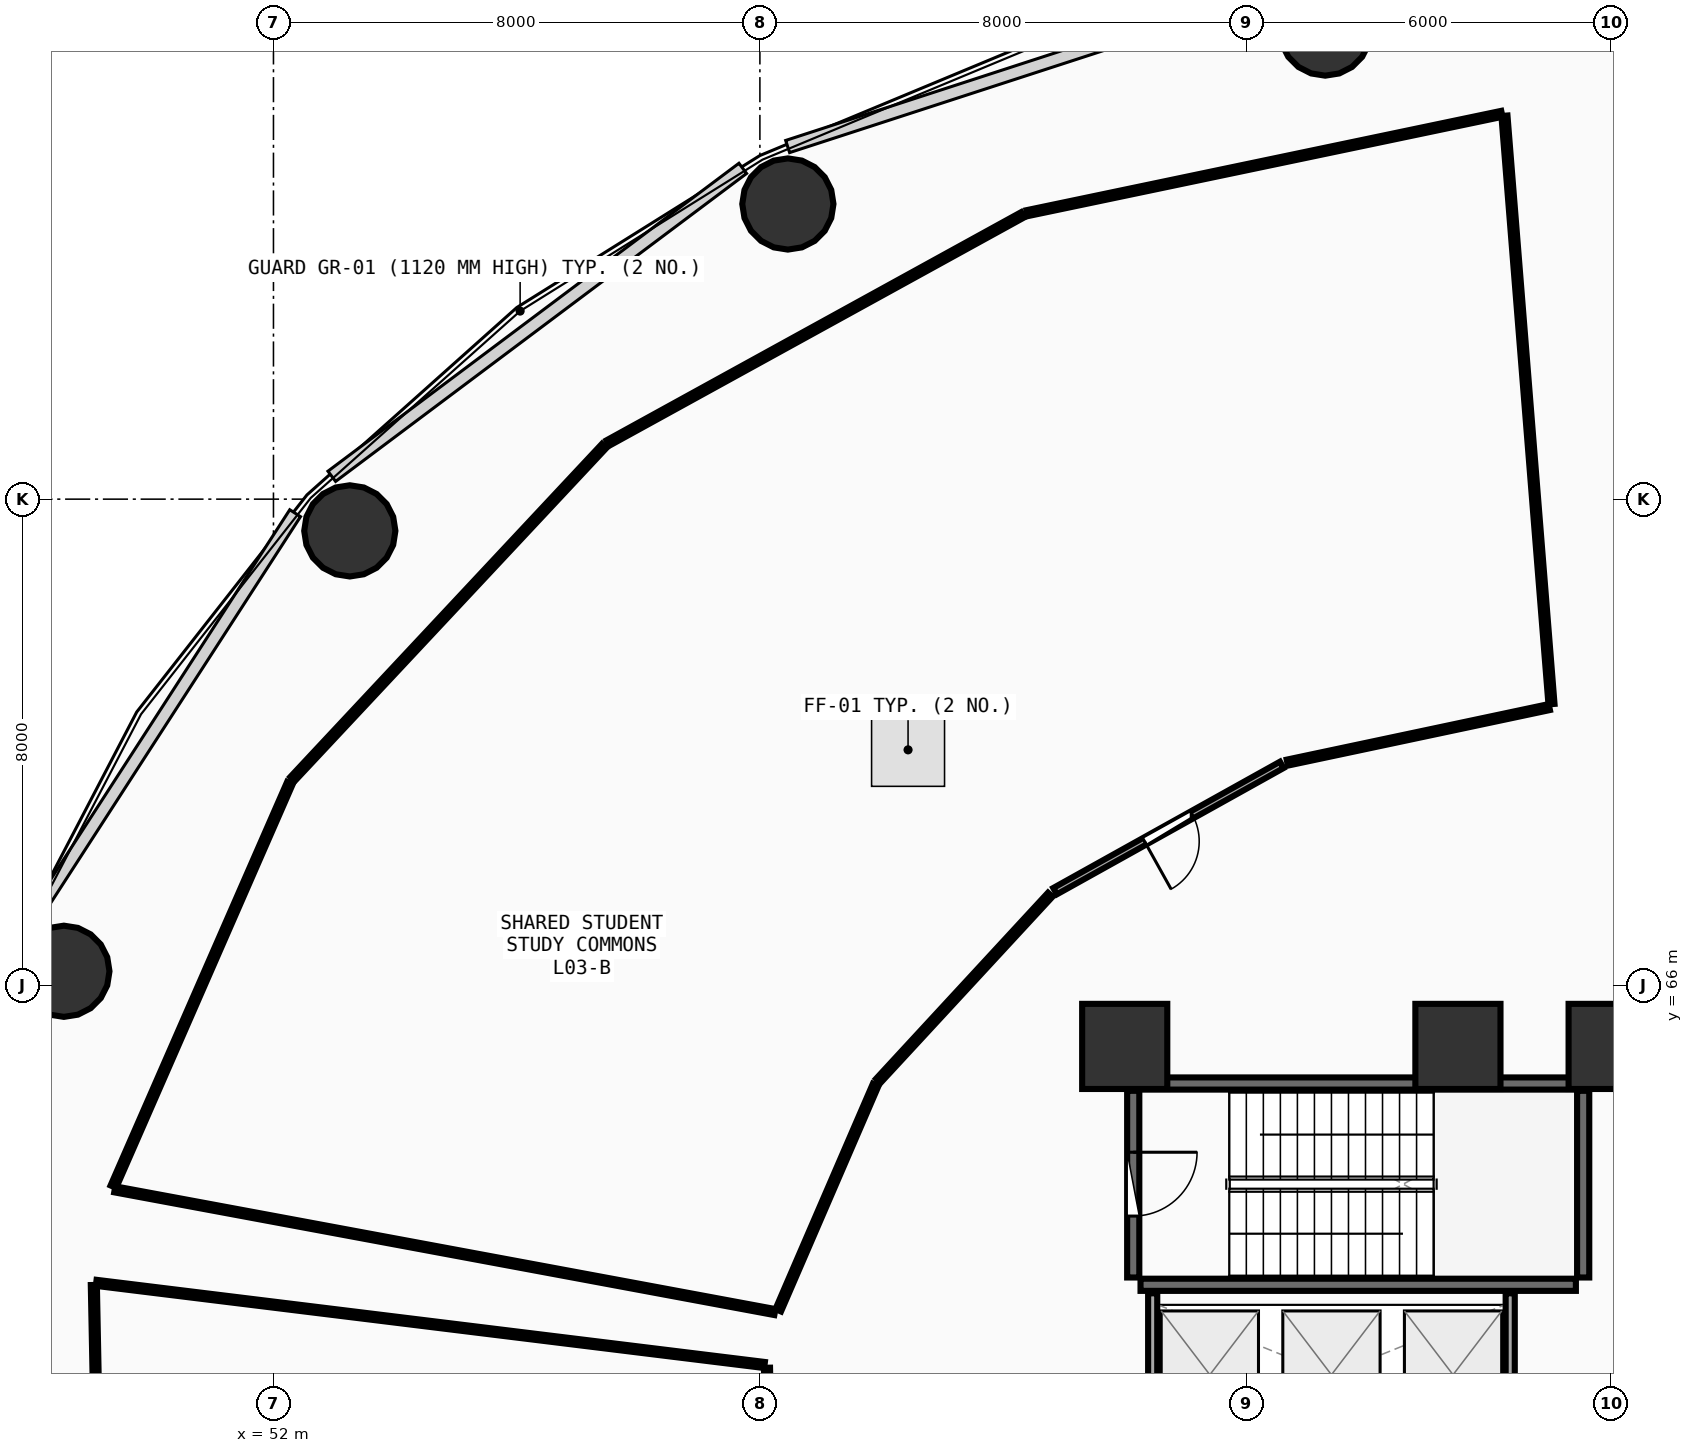
"""IFC4 building model, lengths in metres.
Left out: names, types, materials, properties, quantities, classifications, styles, units other than length and angle.
Written with IfcOpenShell. Run it as: python <this file> out.ifc"""

import sys

from ifc_helpers import new_model, si_unit, direction, frame, frame_2d, origin, origin_2d, place, context, subcontext, project, spatial, rectangle, circle, extrude, element, fill, save


model = new_model("IFC4")
c1 = context("Model", 3, precision=1e-05, world=origin(), true_north=direction((0.0, 1.0)))
c2 = subcontext(c1, "Body", "Model", "MODEL_VIEW")
j1 = project(units=[si_unit("LENGTHUNIT", "METRE"), si_unit("PLANEANGLEUNIT", "RADIAN")], contexts=[c1])
p1 = place(None, origin())
s1 = spatial("IfcSite", under=j1, at=p1, CompositionType="ELEMENT")
p2 = place(p1, origin())
s2 = spatial("IfcBuilding", under=s1, at=p2, CompositionType="ELEMENT")
p3 = place(p2, frame((0.0, 0.0, 13.5)))
s3 = spatial("IfcBuildingStorey", under=s2, at=p3, CompositionType="ELEMENT", Elevation=13.5)
for number, where, z_axis, x_axis in (
    (1, (74.0, 65.0, 0.0), (0.0, 0.0, 1.0), (1.0, 0.0, 0.0)),
    (2, (71.48, 65.0, 0.0), (0.0, 0.0, 1.0), (1.0, 0.0, 0.0)),
    (3, (66.0, 65.0, 0.0), (0.0, 0.0, 1.0), (1.0, 0.0, 0.0)),
):
    element("IfcColumn", number, at=place(p3, frame(where, z_axis=z_axis, x_axis=x_axis)), inside=s3, PredefinedType="PILASTER", context=c2, shape_type="SweptSolid", body=[
        extrude(rectangle(XDim=1.4, YDim=1.4, at=origin_2d()), origin(), (0.0, 0.0, 1.0), 4.5),
    ])
for number, where, z_axis, x_axis in (
    (4, (69.298, 81.714, 0.0), (0.0, 0.0, 1.0), (1.0, 0.0, 0.0)),
    (5, (60.46, 78.854, 0.0), (0.0, 0.0, 1.0), (1.0, 0.0, 0.0)),
    (6, (53.256, 73.478, 0.0), (0.0, 0.0, 1.0), (1.0, 0.0, 0.0)),
    (7, (48.553, 66.236, 0.0), (0.0, 0.0, 1.0), (1.0, 0.0, 0.0)),
):
    element("IfcColumn", number, at=place(p3, frame(where, z_axis=z_axis, x_axis=x_axis)), inside=s3, PredefinedType="COLUMN", context=c2, shape_type="SweptSolid", body=[
        extrude(circle(Radius=0.75, at=origin_2d()), origin(), (0.0, 0.0, 1.0), 4.5),
    ])
p4 = place(p3, frame((66.26, 61.08, 0.0), z_axis=(0.0, 0.0, 1.0), x_axis=(1.0, 0.0, 0.0)))
e8 = element("IfcWall", 8, at=p4, inside=s3, PredefinedType="SHEAR", context=c2, shape_type="SweptSolid", body=[
    extrude(rectangle(XDim=7.16, YDim=0.2, at=frame_2d((3.58, 0.0))), origin(), (0.0, 0.0, 1.0), 4.1),
])
p5 = place(p3, frame((73.54, 61.2, 0.0), z_axis=(0.0, 0.0, 1.0), x_axis=(0.0, 1.0, 0.0)))
e9 = element("IfcWall", 9, at=p5, inside=s3, PredefinedType="SHEAR", context=c2, shape_type="SweptSolid", body=[
    extrude(rectangle(XDim=3.07, YDim=0.2, at=frame_2d((1.535, 0.0))), origin(), (0.0, 0.0, 1.0), 4.1),
])
p6 = place(p3, frame((73.42, 64.39, 0.0), z_axis=(0.0, 0.0, 1.0), x_axis=(-1.0, 0.0, 0.0)))
e10 = element("IfcWall", 10, at=p6, inside=s3, PredefinedType="SHEAR", context=c2, shape_type="SweptSolid", body=[
    extrude(rectangle(XDim=7.16, YDim=0.2, at=frame_2d((3.58, 0.0))), origin(), (0.0, 0.0, 1.0), 4.1),
])
p7 = place(p3, frame((66.14, 64.27, 0.0), z_axis=(0.0, 0.0, 1.0), x_axis=(0.0, -1.0, 0.0)))
e11 = element("IfcWall", 11, at=p7, inside=s3, PredefinedType="SHEAR", context=c2, shape_type="SweptSolid", body=[
    extrude(rectangle(XDim=3.07, YDim=0.2, at=frame_2d((1.535, 0.0))), origin(), (0.0, 0.0, 1.0), 4.1),
])
p8 = place(p7, frame((1.01, 0.0, 0.0)))
e12 = element("IfcOpeningElement", 12, at=p8, cuts=e11, PredefinedType="OPENING", context=c2, shape_type="SweptSolid", body=[
    extrude(rectangle(XDim=1.05, YDim=2.1, at=frame_2d((0.525, 1.05))), frame((0.0, 0.11, 0.0), z_axis=(0.0, -1.0, 0.0), x_axis=(1.0, 0.0, 0.0)), (0.0, 0.0, 1.0), 0.22),
])
p9 = place(p3, frame((74.0, 64.6, 0.0), z_axis=(0.0, 0.0, 1.0), x_axis=(1.0, 0.0, 0.0)))
e13 = element("IfcWall", 13, at=p9, inside=s3, PredefinedType="SHEAR", context=c2, shape_type="SweptSolid", body=[
    extrude(rectangle(XDim=8.0, YDim=0.45, at=frame_2d((4.0, 0.0))), origin(), (0.0, 0.0, 1.0), 4.1),
])
for number, where, z_axis, x_axis in (
    (14, (66.46, 58.48, 0.0), (0.0, 0.0, 1.0), (0.0, 1.0, 0.0)),
    (15, (72.34, 58.48, 0.0), (0.0, 0.0, 1.0), (0.0, 1.0, 0.0)),
):
    element("IfcWall", number, at=place(p3, frame(where, z_axis=z_axis, x_axis=x_axis)), inside=s3, PredefinedType="PARTITIONING", context=c2, shape_type="SweptSolid", body=[
        extrude(rectangle(XDim=2.46, YDim=0.15, at=frame_2d((1.23, 0.0))), origin(), (0.0, 0.0, 1.0), 4.09),
    ])
p10 = place(p3, frame((68.583, 69.63, 0.0), z_axis=(0.0, 0.0, 1.0), x_axis=(-0.873606197164, -0.4866335503, 0.0)))
e16 = element("IfcWall", 16, at=p10, inside=s3, PredefinedType="PARTITIONING", context=c2, shape_type="SweptSolid", body=[
    extrude(rectangle(XDim=4.267, YDim=0.12, at=frame_2d((2.134, 0.0))), origin(), (0.0, 0.0, 1.0), 3.485),
])
p11 = place(p10, frame((1.684, 0.0, 0.0)))
e17 = element("IfcOpeningElement", 17, at=p11, cuts=e16, PredefinedType="OPENING", context=c2, shape_type="SweptSolid", body=[
    extrude(rectangle(XDim=0.9, YDim=2.08, at=frame_2d((0.45, 1.04))), frame((0.0, 0.07, 0.0), z_axis=(0.0, -1.0, 0.0), x_axis=(1.0, 0.0, 0.0)), (0.0, 0.0, 1.0), 0.14),
])
p12 = place(p3, frame((72.983, 70.581, 0.0), z_axis=(0.0, 0.0, 1.0), x_axis=(-0.978253554802, -0.207412590066, 0.0)))
e18 = element("IfcWall", 18, at=p12, inside=s3, PredefinedType="PARTITIONING", context=c2, shape_type="SweptSolid", body=[
    extrude(rectangle(XDim=4.405, YDim=0.1, at=frame_2d((2.202, 0.0))), origin(), (0.0, 0.0, 1.0), 3.485),
])
p13 = place(p3, frame((64.775, 67.495, 0.0), z_axis=(0.0, 0.0, 1.0), x_axis=(-0.678666938136, -0.734446177116, 0.0)))
e19 = element("IfcWall", 19, at=p13, inside=s3, PredefinedType="PARTITIONING", context=c2, shape_type="SweptSolid", body=[
    extrude(rectangle(XDim=4.167, YDim=0.1, at=frame_2d((2.083, 0.0))), origin(), (0.0, 0.0, 1.0), 3.485),
])
p14 = place(p3, frame((61.904, 64.368, 0.0), z_axis=(0.0, 0.0, 1.0), x_axis=(-0.396638629538, -0.917974834927, 0.0)))
e20 = element("IfcWall", 20, at=p14, inside=s3, PredefinedType="PARTITIONING", context=c2, shape_type="SweptSolid", body=[
    extrude(rectangle(XDim=4.039, YDim=0.1, at=frame_2d((2.02, 0.0))), origin(), (0.0, 0.0, 1.0), 4.09),
])
p15 = place(p3, frame((60.247, 60.631, 0.0), z_axis=(0.0, 0.0, 1.0), x_axis=(-0.98315361887, 0.18278118531, 0.0)))
e21 = element("IfcWall", 21, at=p15, inside=s3, PredefinedType="PARTITIONING", context=c2, shape_type="SweptSolid", body=[
    extrude(rectangle(XDim=11.042, YDim=0.1, at=frame_2d((5.521, 0.0))), origin(), (0.0, 0.0, 1.0), 3.785),
])
p16 = place(p3, frame((49.367, 62.694, 0.0), z_axis=(0.0, 0.0, 1.0), x_axis=(0.400764042692, 0.916181304156, 0.0)))
e22 = element("IfcWall", 22, at=p16, inside=s3, PredefinedType="PARTITIONING", context=c2, shape_type="SweptSolid", body=[
    extrude(rectangle(XDim=7.246, YDim=0.1, at=frame_2d((3.623, 0.0))), origin(), (0.0, 0.0, 1.0), 3.485),
])
p17 = place(p3, frame((52.314, 69.398, 0.0), z_axis=(0.0, 0.0, 1.0), x_axis=(0.683252302105, 0.730182368774, 0.0)))
e23 = element("IfcWall", 23, at=p17, inside=s3, PredefinedType="PARTITIONING", context=c2, shape_type="SweptSolid", body=[
    extrude(rectangle(XDim=7.502, YDim=0.1, at=frame_2d((3.751, 0.0))), origin(), (0.0, 0.0, 1.0), 3.485),
])
p18 = place(p3, frame((57.502, 74.924, 0.0), z_axis=(0.0, 0.0, 1.0), x_axis=(0.876163581943, 0.482013877059, 0.0)))
e24 = element("IfcWall", 24, at=p18, inside=s3, PredefinedType="PARTITIONING", context=c2, shape_type="SweptSolid", body=[
    extrude(rectangle(XDim=7.783, YDim=0.1, at=frame_2d((3.892, 0.0))), origin(), (0.0, 0.0, 1.0), 3.485),
])
p19 = place(p3, frame((64.395, 78.703, 0.0), z_axis=(0.0, 0.0, 1.0), x_axis=(0.978799758691, 0.204819511731, 0.0)))
e25 = element("IfcWall", 25, at=p19, inside=s3, PredefinedType="PARTITIONING", context=c2, shape_type="SweptSolid", body=[
    extrude(rectangle(XDim=7.977, YDim=0.1, at=frame_2d((3.988, 0.0))), origin(), (0.0, 0.0, 1.0), 3.485),
])
p20 = place(p3, frame((72.245, 80.305, 0.0), z_axis=(0.0, 0.0, 1.0), x_axis=(0.079702238281, -0.996818716324, 0.0)))
e26 = element("IfcWall", 26, at=p20, inside=s3, PredefinedType="PARTITIONING", context=c2, shape_type="SweptSolid", body=[
    extrude(rectangle(XDim=9.707, YDim=0.1, at=frame_2d((4.854, 0.0))), origin(), (0.0, 0.0, 1.0), 3.785),
])
p21 = place(p3, frame((60.117, 59.716, 0.0), z_axis=(0.0, 0.0, 1.0), x_axis=(0.01950509597, -0.999809757519, 0.0)))
e27 = element("IfcWall", 27, at=p21, inside=s3, PredefinedType="PARTITIONING", context=c2, shape_type="SweptSolid", body=[
    extrude(rectangle(XDim=3.868, YDim=0.1, at=frame_2d((1.934, 0.0))), origin(), (0.0, 0.0, 1.0), 3.485),
])
p22 = place(p3, frame((49.182, 54.15, 0.0), z_axis=(0.0, 0.0, 1.0), x_axis=(-0.019662782265, 0.999806668808, 0.0)))
e28 = element("IfcWall", 28, at=p22, inside=s3, PredefinedType="PARTITIONING", context=c2, shape_type="SweptSolid", body=[
    extrude(rectangle(XDim=6.928, YDim=0.1, at=frame_2d((3.464, 0.0))), origin(), (0.0, 0.0, 1.0), 3.485),
])
p23 = place(p3, frame((49.085, 61.112, 0.0), z_axis=(0.0, 0.0, 1.0), x_axis=(0.992530160612, -0.121999509325, 0.0)))
e29 = element("IfcWall", 29, at=p23, inside=s3, PredefinedType="PARTITIONING", context=c2, shape_type="SweptSolid", body=[
    extrude(rectangle(XDim=11.074, YDim=0.1, at=frame_2d((5.537, 0.0))), origin(), (0.0, 0.0, 1.0), 3.785),
])
p24 = place(p8, origin())
e30 = element("IfcDoor", 30, at=p24, inside=s3, OperationType="SINGLE_SWING_LEFT", PredefinedType="DOOR", context=c2, shape_type="SweptSolid", body=[
    extrude(rectangle(XDim=1.05, YDim=2.1, at=frame_2d((0.525, 1.05))), frame((0.0, 0.025, 0.0), z_axis=(0.0, -1.0, 0.0), x_axis=(1.0, 0.0, 0.0)), (0.0, 0.0, 1.0), 0.05),
])
fill(e12, e30)
p25 = place(p11, origin())
e31 = element("IfcDoor", 31, at=p25, inside=s3, OperationType="SINGLE_SWING_RIGHT", PredefinedType="DOOR", context=c2, shape_type="SweptSolid", body=[
    extrude(rectangle(XDim=0.9, YDim=2.08, at=frame_2d((0.45, 1.04))), frame((0.0, 0.025, 0.0), z_axis=(0.0, -1.0, 0.0), x_axis=(1.0, 0.0, 0.0)), (0.0, 0.0, 1.0), 0.05),
])
fill(e17, e31)
save(model, sys.argv[1])
